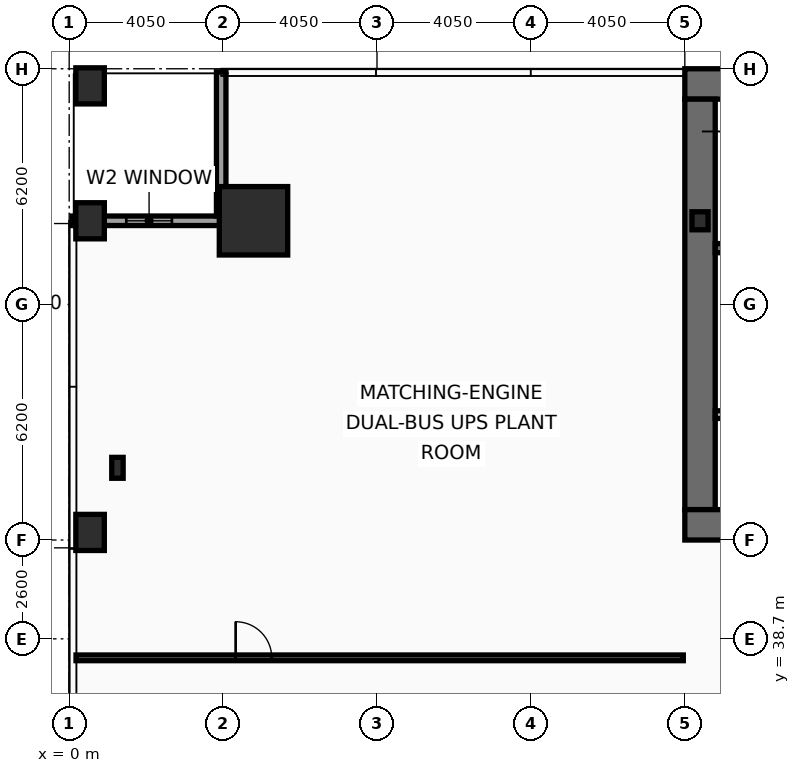
"""IFC4 building model, lengths in metres.
Left out: names, types, materials, properties, quantities, classifications, styles, units other than length and angle.
Written with IfcOpenShell. Run it as: python <this file> out.ifc"""

import sys

from ifc_helpers import new_model, si_unit, direction, frame, frame_2d, origin, origin_2d, place, context, subcontext, project, spatial, rectangle, hollow_rectangle, i_section, extrude, element, fill, save


model = new_model("IFC4")
c1 = context("Model", 3, precision=1e-05, world=origin(), true_north=direction((0.0, 1.0)))
c2 = subcontext(c1, "Body", "Model", "MODEL_VIEW")
j1 = project(units=[si_unit("LENGTHUNIT", "METRE"), si_unit("PLANEANGLEUNIT", "RADIAN")], contexts=[c1])
p1 = place(None, origin())
s1 = spatial("IfcSite", under=j1, at=p1, CompositionType="ELEMENT")
p2 = place(p1, origin())
s2 = spatial("IfcBuilding", under=s1, at=p2, CompositionType="ELEMENT")
p3 = place(p2, frame((0.0, 0.0, 20.4)))
s3 = spatial("IfcBuildingStorey", under=s2, at=p3, CompositionType="ELEMENT", Elevation=20.4)
p4 = place(p3, frame((16.2, 53.3, 0.0), z_axis=(0.0, 0.0, 1.0), x_axis=(1.0, 0.0, 0.0)))
e1 = element("IfcWall", 1, at=p4, inside=s3, PredefinedType="SHEAR", context=c2, shape_type="SweptSolid", body=[
    extrude(rectangle(XDim=40.5, YDim=0.8, at=frame_2d((20.25, 0.0))), origin(), (0.0, 0.0, 1.0), 5.22),
])
p5 = place(p3, frame((16.6, 42.1, 0.0), z_axis=(0.0, 0.0, 1.0), x_axis=(0.0, 1.0, 0.0)))
e2 = element("IfcWall", 2, at=p5, inside=s3, PredefinedType="SHEAR", context=c2, shape_type="SweptSolid", body=[
    extrude(rectangle(XDim=10.8, YDim=0.8, at=frame_2d((5.4, 0.0))), origin(), (0.0, 0.0, 1.0), 5.22),
])
p6 = place(p3, frame((18.65, 41.7, 0.0), z_axis=(0.0, 0.0, 1.0), x_axis=(-1.0, 0.0, 0.0)))
e3 = element("IfcWall", 3, at=p6, inside=s3, PredefinedType="SHEAR", context=c2, shape_type="SweptSolid", body=[
    extrude(rectangle(XDim=2.45, YDim=0.8, at=frame_2d((1.225, 0.0))), origin(), (0.0, 0.0, 1.0), 5.22),
])
p7 = place(p3, frame((17.0, 48.98, 0.0), z_axis=(0.0, 0.0, 1.0), x_axis=(1.0, 0.0, 0.0)))
e4 = element("IfcWall", 4, at=p7, inside=s3, PredefinedType="SHEAR", context=c2, shape_type="SweptSolid", body=[
    extrude(rectangle(XDim=7.22, YDim=0.24, at=frame_2d((3.61, 0.0))), origin(), (0.0, 0.0, 1.0), 5.22),
])
p8 = place(p7, frame((0.22, 0.0, 0.0)))
e5 = element("IfcOpeningElement", 5, at=p8, cuts=e4, PredefinedType="OPENING", context=c2, shape_type="SweptSolid", body=[
    extrude(rectangle(XDim=1.05, YDim=2.15, at=frame_2d((0.525, 1.075))), frame((0.0, 0.13, 0.0), z_axis=(0.0, -1.0, 0.0), x_axis=(1.0, 0.0, 0.0)), (0.0, 0.0, 1.0), 0.26),
])
p9 = place(p3, frame((4.85, 49.7, 0.0), z_axis=(0.0, 0.0, 1.0), x_axis=(1.0, 0.0, 0.0)))
e6 = element("IfcColumn", 6, at=p9, inside=s3, PredefinedType="COLUMN", context=c2, shape_type="SweptSolid", body=[
    extrude(hollow_rectangle(XDim=1.8, YDim=1.8, WallThickness=0.08, at=origin_2d()), origin(), (0.0, 0.0, 1.0), 5.4),
])
p10 = place(p3, frame((1.27, 43.2, 0.0), z_axis=(0.0, 0.0, 1.0), x_axis=(1.0, 0.0, 0.0)))
e7 = element("IfcColumn", 7, at=p10, inside=s3, PredefinedType="COLUMN", context=c2, shape_type="SweptSolid", body=[
    extrude(i_section(OverallWidth=0.3, OverallDepth=0.55, WebThickness=0.015, FlangeThickness=0.029, at=origin_2d()), origin(), (0.0, 0.0, 1.0), 5.4),
])
p11 = place(p3, frame((16.6, 49.7, 0.0), z_axis=(0.0, 0.0, 1.0), x_axis=(1.0, 0.0, 0.0)))
e8 = element("IfcColumn", 8, at=p11, inside=s3, PredefinedType="COLUMN", context=c2, shape_type="SweptSolid", body=[
    extrude(i_section(OverallWidth=0.424, OverallDepth=0.474, WebThickness=0.048, FlangeThickness=0.077, at=origin_2d()), origin(), (0.0, 0.0, 1.0), 5.4),
])
for number, where, z_axis, x_axis in (
    (9, (0.55, 49.7, 0.0), (0.0, 0.0, 1.0), (1.0, 0.0, 0.0)),
    (10, (0.55, 53.25, 0.0), (0.0, 0.0, 1.0), (1.0, 0.0, 0.0)),
    (11, (0.55, 41.5, 0.0), (0.0, 0.0, 1.0), (1.0, 0.0, 0.0)),
):
    element("IfcColumn", number, at=place(p3, frame(where, z_axis=z_axis, x_axis=x_axis)), inside=s3, PredefinedType="PILASTER", context=c2, shape_type="SweptSolid", body=[
        extrude(rectangle(XDim=0.75, YDim=0.95, at=origin_2d()), origin(), (0.0, 0.0, 1.0), 5.4),
    ])
p12 = place(p3, frame((0.08, 49.7, 0.0), z_axis=(0.0, 0.0, 1.0), x_axis=(1.0, 0.0, 0.0)))
e12 = element("IfcWall", 12, at=p12, inside=s3, PredefinedType="SOLIDWALL", context=c2, shape_type="SweptSolid", body=[
    extrude(rectangle(XDim=4.045, YDim=0.25, at=frame_2d((2.022, 0.0))), origin(), (0.0, 0.0, 1.0), 3.76),
])
p13 = place(p12, frame((1.423, 0.0, 0.9)))
e13 = element("IfcOpeningElement", 13, at=p13, cuts=e12, PredefinedType="OPENING", context=c2, shape_type="SweptSolid", body=[
    extrude(rectangle(XDim=1.2, YDim=2.8, at=frame_2d((0.6, 1.4))), frame((0.0, 0.135, 0.0), z_axis=(0.0, -1.0, 0.0), x_axis=(1.0, 0.0, 0.0)), (0.0, 0.0, 1.0), 0.27),
])
p14 = place(p3, frame((4.0, 49.825, 0.0), z_axis=(0.0, 0.0, 1.0), x_axis=(0.0, 1.0, 0.0)))
e14 = element("IfcWall", 14, at=p14, inside=s3, PredefinedType="SOLIDWALL", context=c2, shape_type="SweptSolid", body=[
    extrude(rectangle(XDim=3.795, YDim=0.25, at=frame_2d((1.897, 0.0))), origin(), (0.0, 0.0, 1.0), 3.76),
])
p15 = place(p3, frame((17.0, 44.6, 0.0), z_axis=(0.0, 0.0, 1.0), x_axis=(1.0, 0.0, 0.0)))
e15 = element("IfcWall", 15, at=p15, inside=s3, PredefinedType="PARTITIONING", context=c2, shape_type="SweptSolid", body=[
    extrude(rectangle(XDim=4.0, YDim=0.2, at=frame_2d((2.0, 0.0))), origin(), (0.0, 0.0, 1.0), 5.22),
])
p16 = place(p15, frame((1.25, 0.0, 0.0)))
e16 = element("IfcOpeningElement", 16, at=p16, cuts=e15, PredefinedType="OPENING", context=c2, shape_type="SweptSolid", body=[
    extrude(rectangle(XDim=1.05, YDim=2.15, at=frame_2d((0.525, 1.075))), frame((0.0, 0.11, 0.0), z_axis=(0.0, -1.0, 0.0), x_axis=(1.0, 0.0, 0.0)), (0.0, 0.0, 1.0), 0.22),
])
p17 = place(p3, frame((0.18, 38.2, 0.0), z_axis=(0.0, 0.0, 1.0), x_axis=(1.0, 0.0, 0.0)))
e17 = element("IfcWall", 17, at=p17, inside=s3, PredefinedType="PARTITIONING", context=c2, shape_type="SweptSolid", body=[
    extrude(rectangle(XDim=15.98, YDim=0.15, at=frame_2d((7.99, 0.0))), origin(), (0.0, 0.0, 1.0), 4.56),
])
p18 = place(p17, frame((4.2, 0.0, 0.0)))
e18 = element("IfcOpeningElement", 18, at=p18, cuts=e17, PredefinedType="OPENING", context=c2, shape_type="SweptSolid", body=[
    extrude(rectangle(XDim=0.95, YDim=2.1, at=frame_2d((0.475, 1.05))), frame((0.0, 0.085, 0.0), z_axis=(0.0, -1.0, 0.0), x_axis=(1.0, 0.0, 0.0)), (0.0, 0.0, 1.0), 0.17),
])
p19 = place(p13, origin())
e19 = element("IfcWindow", 19, at=p19, inside=s3, PartitioningType="SINGLE_PANEL", PredefinedType="WINDOW", context=c2, shape_type="SweptSolid", body=[
    extrude(rectangle(XDim=1.2, YDim=2.8, at=frame_2d((0.6, 1.4))), frame((0.0, 0.03, 0.0), z_axis=(0.0, -1.0, 0.0), x_axis=(1.0, 0.0, 0.0)), (0.0, 0.0, 1.0), 0.06),
])
fill(e13, e19)
p20 = place(p18, origin())
e20 = element("IfcDoor", 20, at=p20, inside=s3, OperationType="SINGLE_SWING_LEFT", PredefinedType="DOOR", context=c2, shape_type="SweptSolid", body=[
    extrude(rectangle(XDim=0.95, YDim=2.1, at=frame_2d((0.475, 1.05))), frame((0.0, 0.025, 0.0), z_axis=(0.0, -1.0, 0.0), x_axis=(1.0, 0.0, 0.0)), (0.0, 0.0, 1.0), 0.05),
])
fill(e18, e20)
save(model, sys.argv[1])
